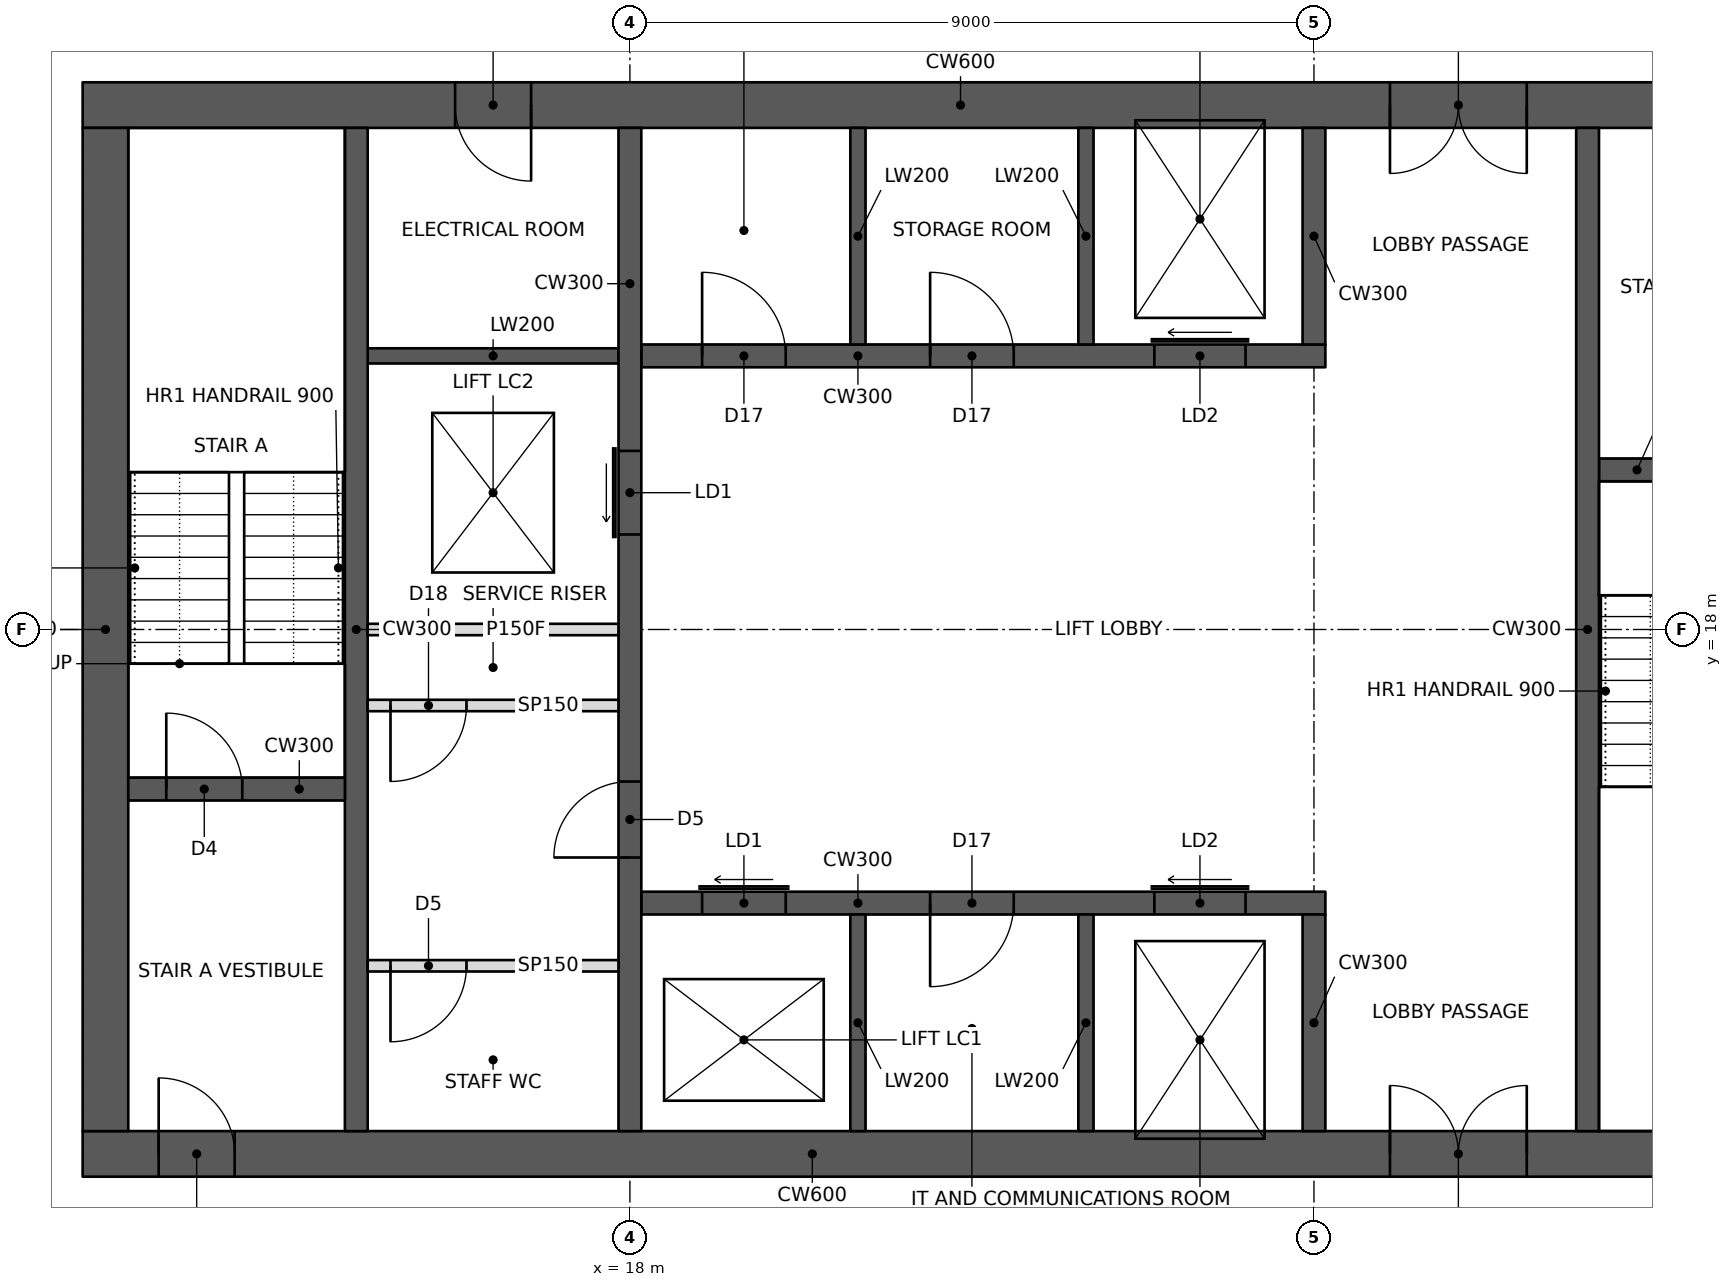
"""IFC4 building model, lengths in metres.
Left out: names, types, materials, properties, quantities, classifications, styles, units other than length and angle.
Written with IfcOpenShell. Run it as: python <this file> out.ifc"""

import sys

from ifc_helpers import new_model, si_unit, direction, frame, frame_2d, origin, place, context, subcontext, project, spatial, rectangle, extrude, element, fill, save


model = new_model("IFC4")
c1 = context("Model", 3, precision=1e-05, world=origin(), true_north=direction((0.0, 1.0)))
c2 = subcontext(c1, "Body", "Model", "MODEL_VIEW")
j1 = project(units=[si_unit("LENGTHUNIT", "METRE"), si_unit("PLANEANGLEUNIT", "RADIAN")], contexts=[c1])
p1 = place(None, origin())
s1 = spatial("IfcSite", under=j1, at=p1, CompositionType="ELEMENT")
p2 = place(p1, origin())
s2 = spatial("IfcBuilding", under=s1, at=p2, CompositionType="ELEMENT")
p3 = place(p2, frame((0.0, 0.0, 187.6)))
s3 = spatial("IfcBuildingStorey", under=s2, at=p3, CompositionType="ELEMENT", Elevation=187.6)
p4 = place(p3, frame((10.8, 11.1, 0.0), z_axis=(0.0, 0.0, 1.0), x_axis=(1.0, 0.0, 0.0)))
e1 = element("IfcWall", 1, at=p4, inside=s3, PredefinedType="SHEAR", context=c2, shape_type="SweptSolid", body=[
    extrude(rectangle(XDim=23.4, YDim=0.6, at=frame_2d((11.7, 0.0))), origin(), (0.0, 0.0, 1.0), 3.4),
])
p5 = place(p4, frame((1.0, 0.0, 0.0)))
e2 = element("IfcOpeningElement", 2, at=p5, cuts=e1, PredefinedType="OPENING", context=c2, shape_type="SweptSolid", body=[
    extrude(rectangle(XDim=1.0, YDim=2.1, at=frame_2d((0.5, 1.05))), frame((0.0, 0.31, 0.0), z_axis=(0.0, -1.0, 0.0), x_axis=(1.0, 0.0, 0.0)), (0.0, 0.0, 1.0), 0.62),
])
p6 = place(p4, frame((17.2, 0.0, 0.0)))
e3 = element("IfcOpeningElement", 3, at=p6, cuts=e1, PredefinedType="OPENING", context=c2, shape_type="SweptSolid", body=[
    extrude(rectangle(XDim=1.8, YDim=2.1, at=frame_2d((0.9, 1.05))), frame((0.0, 0.31, 0.0), z_axis=(0.0, -1.0, 0.0), x_axis=(1.0, 0.0, 0.0)), (0.0, 0.0, 1.0), 0.62),
])
p7 = place(p3, frame((10.8, 24.9, 0.0), z_axis=(0.0, 0.0, 1.0), x_axis=(1.0, 0.0, 0.0)))
e4 = element("IfcWall", 4, at=p7, inside=s3, PredefinedType="SHEAR", context=c2, shape_type="SweptSolid", body=[
    extrude(rectangle(XDim=23.4, YDim=0.6, at=frame_2d((11.7, 0.0))), origin(), (0.0, 0.0, 1.0), 3.4),
])
p8 = place(p7, frame((17.2, 0.0, 0.0)))
e5 = element("IfcOpeningElement", 5, at=p8, cuts=e4, PredefinedType="OPENING", context=c2, shape_type="SweptSolid", body=[
    extrude(rectangle(XDim=1.8, YDim=2.1, at=frame_2d((0.9, 1.05))), frame((0.0, 0.31, 0.0), z_axis=(0.0, -1.0, 0.0), x_axis=(1.0, 0.0, 0.0)), (0.0, 0.0, 1.0), 0.62),
])
p9 = place(p7, frame((21.1, 0.0, 0.0)))
e6 = element("IfcOpeningElement", 6, at=p9, cuts=e4, PredefinedType="OPENING", context=c2, shape_type="SweptSolid", body=[
    extrude(rectangle(XDim=1.0, YDim=2.1, at=frame_2d((0.5, 1.05))), frame((0.0, 0.31, 0.0), z_axis=(0.0, -1.0, 0.0), x_axis=(1.0, 0.0, 0.0)), (0.0, 0.0, 1.0), 0.62),
])
p10 = place(p7, frame((4.9, 0.0, 0.0)))
e7 = element("IfcOpeningElement", 7, at=p10, cuts=e4, PredefinedType="OPENING", context=c2, shape_type="SweptSolid", body=[
    extrude(rectangle(XDim=1.0, YDim=2.1, at=frame_2d((0.5, 1.05))), frame((0.0, 0.31, 0.0), z_axis=(0.0, -1.0, 0.0), x_axis=(1.0, 0.0, 0.0)), (0.0, 0.0, 1.0), 0.62),
])
p11 = place(p3, frame((11.1, 11.4, 0.0), z_axis=(0.0, 0.0, 1.0), x_axis=(0.0, 1.0, 0.0)))
e8 = element("IfcWall", 8, at=p11, inside=s3, PredefinedType="SHEAR", context=c2, shape_type="SweptSolid", body=[
    extrude(rectangle(XDim=13.2, YDim=0.6, at=frame_2d((6.6, 0.0))), origin(), (0.0, 0.0, 1.0), 3.4),
])
p12 = place(p3, frame((14.4, 11.4, 0.0), z_axis=(0.0, 0.0, 1.0), x_axis=(0.0, 1.0, 0.0)))
e9 = element("IfcWall", 9, at=p12, inside=s3, PredefinedType="SHEAR", context=c2, shape_type="SweptSolid", body=[
    extrude(rectangle(XDim=13.2, YDim=0.3, at=frame_2d((6.6, 0.0))), origin(), (0.0, 0.0, 1.0), 3.4),
])
p13 = place(p3, frame((11.4, 15.9, 0.0), z_axis=(0.0, 0.0, 1.0), x_axis=(1.0, 0.0, 0.0)))
e10 = element("IfcWall", 10, at=p13, inside=s3, PredefinedType="SHEAR", context=c2, shape_type="SweptSolid", body=[
    extrude(rectangle(XDim=2.85, YDim=0.3, at=frame_2d((1.425, 0.0))), origin(), (0.0, 0.0, 1.0), 3.4),
])
p14 = place(p13, frame((0.5, 0.0, 0.0)))
e11 = element("IfcOpeningElement", 11, at=p14, cuts=e10, PredefinedType="OPENING", context=c2, shape_type="SweptSolid", body=[
    extrude(rectangle(XDim=1.0, YDim=2.1, at=frame_2d((0.5, 1.05))), frame((0.0, 0.16, 0.0), z_axis=(0.0, -1.0, 0.0), x_axis=(1.0, 0.0, 0.0)), (0.0, 0.0, 1.0), 0.32),
])
p15 = place(p3, frame((18.0, 11.4, 0.0), z_axis=(0.0, 0.0, 1.0), x_axis=(0.0, 1.0, 0.0)))
e12 = element("IfcWall", 12, at=p15, inside=s3, PredefinedType="SHEAR", context=c2, shape_type="SweptSolid", body=[
    extrude(rectangle(XDim=13.2, YDim=0.3, at=frame_2d((6.6, 0.0))), origin(), (0.0, 0.0, 1.0), 3.4),
])
p16 = place(p15, frame((3.6, 0.0, 0.0)))
e13 = element("IfcOpeningElement", 13, at=p16, cuts=e12, PredefinedType="OPENING", context=c2, shape_type="SweptSolid", body=[
    extrude(rectangle(XDim=1.0, YDim=2.1, at=frame_2d((0.5, 1.05))), frame((0.0, 0.16, 0.0), z_axis=(0.0, -1.0, 0.0), x_axis=(1.0, 0.0, 0.0)), (0.0, 0.0, 1.0), 0.32),
])
p17 = place(p15, frame((7.85, 0.0, 0.0)))
e14 = element("IfcOpeningElement", 14, at=p17, cuts=e12, PredefinedType="OPENING", context=c2, shape_type="SweptSolid", body=[
    extrude(rectangle(XDim=1.1, YDim=2.1, at=frame_2d((0.55, 1.05))), frame((0.0, 0.16, 0.0), z_axis=(0.0, -1.0, 0.0), x_axis=(1.0, 0.0, 0.0)), (0.0, 0.0, 1.0), 0.32),
])
p18 = place(p3, frame((14.55, 18.0, 0.0), z_axis=(0.0, 0.0, 1.0), x_axis=(1.0, 0.0, 0.0)))
e15 = element("IfcWall", 15, at=p18, inside=s3, PredefinedType="PARTITIONING", context=c2, shape_type="SweptSolid", body=[
    extrude(rectangle(XDim=3.3, YDim=0.15, at=frame_2d((1.65, 0.0))), origin(), (0.0, 0.0, 1.0), 3.2),
])
p19 = place(p3, frame((18.15, 14.4, 0.0), z_axis=(0.0, 0.0, 1.0), x_axis=(1.0, 0.0, 0.0)))
e16 = element("IfcWall", 16, at=p19, inside=s3, PredefinedType="SHEAR", context=c2, shape_type="SweptSolid", body=[
    extrude(rectangle(XDim=9.0, YDim=0.3, at=frame_2d((4.5, 0.0))), origin(), (0.0, 0.0, 1.0), 3.4),
])
p20 = place(p19, frame((0.8, 0.0, 0.0)))
e17 = element("IfcOpeningElement", 17, at=p20, cuts=e16, PredefinedType="OPENING", context=c2, shape_type="SweptSolid", body=[
    extrude(rectangle(XDim=1.1, YDim=2.1, at=frame_2d((0.55, 1.05))), frame((0.0, 0.16, 0.0), z_axis=(0.0, -1.0, 0.0), x_axis=(1.0, 0.0, 0.0)), (0.0, 0.0, 1.0), 0.32),
])
p21 = place(p19, frame((6.75, 0.0, 0.0)))
e18 = element("IfcOpeningElement", 18, at=p21, cuts=e16, PredefinedType="OPENING", context=c2, shape_type="SweptSolid", body=[
    extrude(rectangle(XDim=1.2, YDim=2.1, at=frame_2d((0.6, 1.05))), frame((0.0, 0.16, 0.0), z_axis=(0.0, -1.0, 0.0), x_axis=(1.0, 0.0, 0.0)), (0.0, 0.0, 1.0), 0.32),
])
p22 = place(p19, frame((3.8, 0.0, 0.0)))
e19 = element("IfcOpeningElement", 19, at=p22, cuts=e16, PredefinedType="OPENING", context=c2, shape_type="SweptSolid", body=[
    extrude(rectangle(XDim=1.1, YDim=2.1, at=frame_2d((0.55, 1.05))), frame((0.0, 0.16, 0.0), z_axis=(0.0, -1.0, 0.0), x_axis=(1.0, 0.0, 0.0)), (0.0, 0.0, 1.0), 0.32),
])
p23 = place(p3, frame((27.0, 11.4, 0.0), z_axis=(0.0, 0.0, 1.0), x_axis=(0.0, 1.0, 0.0)))
e20 = element("IfcWall", 20, at=p23, inside=s3, PredefinedType="SHEAR", context=c2, shape_type="SweptSolid", body=[
    extrude(rectangle(XDim=2.85, YDim=0.3, at=frame_2d((1.425, 0.0))), origin(), (0.0, 0.0, 1.0), 3.4),
])
for number, where, z_axis, x_axis in (
    (21, (21.0, 11.4, 0.0), (0.0, 0.0, 1.0), (0.0, 1.0, 0.0)),
    (22, (24.0, 11.4, 0.0), (0.0, 0.0, 1.0), (0.0, 1.0, 0.0)),
):
    element("IfcWall", number, at=place(p3, frame(where, z_axis=z_axis, x_axis=x_axis)), inside=s3, PredefinedType="SHEAR", context=c2, shape_type="SweptSolid", body=[
        extrude(rectangle(XDim=2.85, YDim=0.2, at=frame_2d((1.425, 0.0))), origin(), (0.0, 0.0, 1.0), 3.4),
    ])
p24 = place(p3, frame((18.15, 21.6, 0.0), z_axis=(0.0, 0.0, 1.0), x_axis=(1.0, 0.0, 0.0)))
e23 = element("IfcWall", 23, at=p24, inside=s3, PredefinedType="SHEAR", context=c2, shape_type="SweptSolid", body=[
    extrude(rectangle(XDim=9.0, YDim=0.3, at=frame_2d((4.5, 0.0))), origin(), (0.0, 0.0, 1.0), 3.4),
])
p25 = place(p24, frame((6.75, 0.0, 0.0)))
e24 = element("IfcOpeningElement", 24, at=p25, cuts=e23, PredefinedType="OPENING", context=c2, shape_type="SweptSolid", body=[
    extrude(rectangle(XDim=1.2, YDim=2.1, at=frame_2d((0.6, 1.05))), frame((0.0, 0.16, 0.0), z_axis=(0.0, -1.0, 0.0), x_axis=(1.0, 0.0, 0.0)), (0.0, 0.0, 1.0), 0.32),
])
p26 = place(p24, frame((0.8, 0.0, 0.0)))
e25 = element("IfcOpeningElement", 25, at=p26, cuts=e23, PredefinedType="OPENING", context=c2, shape_type="SweptSolid", body=[
    extrude(rectangle(XDim=1.1, YDim=2.1, at=frame_2d((0.55, 1.05))), frame((0.0, 0.16, 0.0), z_axis=(0.0, -1.0, 0.0), x_axis=(1.0, 0.0, 0.0)), (0.0, 0.0, 1.0), 0.32),
])
p27 = place(p24, frame((3.8, 0.0, 0.0)))
e26 = element("IfcOpeningElement", 26, at=p27, cuts=e23, PredefinedType="OPENING", context=c2, shape_type="SweptSolid", body=[
    extrude(rectangle(XDim=1.1, YDim=2.1, at=frame_2d((0.55, 1.05))), frame((0.0, 0.16, 0.0), z_axis=(0.0, -1.0, 0.0), x_axis=(1.0, 0.0, 0.0)), (0.0, 0.0, 1.0), 0.32),
])
p28 = place(p3, frame((27.0, 21.75, 0.0), z_axis=(0.0, 0.0, 1.0), x_axis=(0.0, 1.0, 0.0)))
e27 = element("IfcWall", 27, at=p28, inside=s3, PredefinedType="SHEAR", context=c2, shape_type="SweptSolid", body=[
    extrude(rectangle(XDim=2.85, YDim=0.3, at=frame_2d((1.425, 0.0))), origin(), (0.0, 0.0, 1.0), 3.4),
])
for number, where, z_axis, x_axis in (
    (28, (21.0, 21.75, 0.0), (0.0, 0.0, 1.0), (0.0, 1.0, 0.0)),
    (29, (24.0, 21.75, 0.0), (0.0, 0.0, 1.0), (0.0, 1.0, 0.0)),
):
    element("IfcWall", number, at=place(p3, frame(where, z_axis=z_axis, x_axis=x_axis)), inside=s3, PredefinedType="SHEAR", context=c2, shape_type="SweptSolid", body=[
        extrude(rectangle(XDim=2.85, YDim=0.2, at=frame_2d((1.425, 0.0))), origin(), (0.0, 0.0, 1.0), 3.4),
    ])
p29 = place(p3, frame((30.6, 11.4, 0.0), z_axis=(0.0, 0.0, 1.0), x_axis=(0.0, 1.0, 0.0)))
e30 = element("IfcWall", 30, at=p29, inside=s3, PredefinedType="SHEAR", context=c2, shape_type="SweptSolid", body=[
    extrude(rectangle(XDim=13.2, YDim=0.3, at=frame_2d((6.6, 0.0))), origin(), (0.0, 0.0, 1.0), 3.4),
])
p30 = place(p3, frame((30.75, 20.1, 0.0), z_axis=(0.0, 0.0, 1.0), x_axis=(1.0, 0.0, 0.0)))
e31 = element("IfcWall", 31, at=p30, inside=s3, PredefinedType="SHEAR", context=c2, shape_type="SweptSolid", body=[
    extrude(rectangle(XDim=2.85, YDim=0.3, at=frame_2d((1.425, 0.0))), origin(), (0.0, 0.0, 1.0), 3.4),
])
p31 = place(p30, frame((1.15, 0.0, 0.0)))
e32 = element("IfcOpeningElement", 32, at=p31, cuts=e31, PredefinedType="OPENING", context=c2, shape_type="SweptSolid", body=[
    extrude(rectangle(XDim=1.0, YDim=2.1, at=frame_2d((0.5, 1.05))), frame((0.0, 0.16, 0.0), z_axis=(0.0, -1.0, 0.0), x_axis=(1.0, 0.0, 0.0)), (0.0, 0.0, 1.0), 0.32),
])
p32 = place(p3, frame((14.55, 21.6, 0.0), z_axis=(0.0, 0.0, 1.0), x_axis=(1.0, 0.0, 0.0)))
e33 = element("IfcWall", 33, at=p32, inside=s3, PredefinedType="SHEAR", context=c2, shape_type="SweptSolid", body=[
    extrude(rectangle(XDim=3.3, YDim=0.2, at=frame_2d((1.65, 0.0))), origin(), (0.0, 0.0, 1.0), 3.4),
])
p33 = place(p3, frame((14.55, 17.0, 0.0), z_axis=(0.0, 0.0, 1.0), x_axis=(1.0, 0.0, 0.0)))
e34 = element("IfcWall", 34, at=p33, inside=s3, PredefinedType="PARTITIONING", context=c2, shape_type="SweptSolid", body=[
    extrude(rectangle(XDim=3.3, YDim=0.15, at=frame_2d((1.65, 0.0))), origin(), (0.0, 0.0, 1.0), 3.2),
])
p34 = place(p33, frame((0.3, 0.0, 0.0)))
e35 = element("IfcOpeningElement", 35, at=p34, cuts=e34, PredefinedType="OPENING", context=c2, shape_type="SweptSolid", body=[
    extrude(rectangle(XDim=1.0, YDim=2.1, at=frame_2d((0.5, 1.05))), frame((0.0, 0.085, 0.0), z_axis=(0.0, -1.0, 0.0), x_axis=(1.0, 0.0, 0.0)), (0.0, 0.0, 1.0), 0.17),
])
p35 = place(p3, frame((14.55, 13.575, 0.0), z_axis=(0.0, 0.0, 1.0), x_axis=(1.0, 0.0, 0.0)))
e36 = element("IfcWall", 36, at=p35, inside=s3, PredefinedType="PARTITIONING", context=c2, shape_type="SweptSolid", body=[
    extrude(rectangle(XDim=3.3, YDim=0.15, at=frame_2d((1.65, 0.0))), origin(), (0.0, 0.0, 1.0), 3.2),
])
p36 = place(p35, frame((0.3, 0.0, 0.0)))
e37 = element("IfcOpeningElement", 37, at=p36, cuts=e36, PredefinedType="OPENING", context=c2, shape_type="SweptSolid", body=[
    extrude(rectangle(XDim=1.0, YDim=2.1, at=frame_2d((0.5, 1.05))), frame((0.0, 0.085, 0.0), z_axis=(0.0, -1.0, 0.0), x_axis=(1.0, 0.0, 0.0)), (0.0, 0.0, 1.0), 0.17),
])
p37 = place(p34, frame((1.0, 0.0, 0.0), z_axis=(0.0, 0.0, 1.0), x_axis=(-1.0, 0.0, 0.0)))
e38 = element("IfcDoor", 38, at=p37, inside=s3, OperationType="SINGLE_SWING_RIGHT", PredefinedType="DOOR", context=c2, shape_type="SweptSolid", body=[
    extrude(rectangle(XDim=1.0, YDim=2.1, at=frame_2d((0.5, 1.05))), frame((0.0, 0.025, 0.0), z_axis=(0.0, -1.0, 0.0), x_axis=(1.0, 0.0, 0.0)), (0.0, 0.0, 1.0), 0.05),
])
fill(e35, e38)
p38 = place(p36, frame((1.0, 0.0, 0.0), z_axis=(0.0, 0.0, 1.0), x_axis=(-1.0, 0.0, 0.0)))
e39 = element("IfcDoor", 39, at=p38, inside=s3, OperationType="SINGLE_SWING_RIGHT", PredefinedType="DOOR", context=c2, shape_type="SweptSolid", body=[
    extrude(rectangle(XDim=1.0, YDim=2.1, at=frame_2d((0.5, 1.05))), frame((0.0, 0.025, 0.0), z_axis=(0.0, -1.0, 0.0), x_axis=(1.0, 0.0, 0.0)), (0.0, 0.0, 1.0), 0.05),
])
fill(e37, e39)
p39 = place(p5, origin())
e40 = element("IfcDoor", 40, at=p39, inside=s3, OperationType="SINGLE_SWING_LEFT", PredefinedType="DOOR", context=c2, shape_type="SweptSolid", body=[
    extrude(rectangle(XDim=1.0, YDim=2.1, at=frame_2d((0.5, 1.05))), frame((0.0, 0.025, 0.0), z_axis=(0.0, -1.0, 0.0), x_axis=(1.0, 0.0, 0.0)), (0.0, 0.0, 1.0), 0.05),
])
fill(e2, e40)
p40 = place(p14, origin())
e41 = element("IfcDoor", 41, at=p40, inside=s3, OperationType="SINGLE_SWING_LEFT", PredefinedType="DOOR", context=c2, shape_type="SweptSolid", body=[
    extrude(rectangle(XDim=1.0, YDim=2.1, at=frame_2d((0.5, 1.05))), frame((0.0, 0.025, 0.0), z_axis=(0.0, -1.0, 0.0), x_axis=(1.0, 0.0, 0.0)), (0.0, 0.0, 1.0), 0.05),
])
fill(e11, e41)
p41 = place(p6, origin())
e42 = element("IfcDoor", 42, at=p41, inside=s3, OperationType="DOUBLE_DOOR_SINGLE_SWING", PredefinedType="DOOR", context=c2, shape_type="SweptSolid", body=[
    extrude(rectangle(XDim=1.8, YDim=2.1, at=frame_2d((0.9, 1.05))), frame((0.0, 0.025, 0.0), z_axis=(0.0, -1.0, 0.0), x_axis=(1.0, 0.0, 0.0)), (0.0, 0.0, 1.0), 0.05),
])
fill(e3, e42)
p42 = place(p8, frame((1.8, 0.0, 0.0), z_axis=(0.0, 0.0, 1.0), x_axis=(-1.0, 0.0, 0.0)))
e43 = element("IfcDoor", 43, at=p42, inside=s3, OperationType="DOUBLE_DOOR_SINGLE_SWING", PredefinedType="DOOR", context=c2, shape_type="SweptSolid", body=[
    extrude(rectangle(XDim=1.8, YDim=2.1, at=frame_2d((0.9, 1.05))), frame((0.0, 0.025, 0.0), z_axis=(0.0, -1.0, 0.0), x_axis=(1.0, 0.0, 0.0)), (0.0, 0.0, 1.0), 0.05),
])
fill(e5, e43)
p43 = place(p16, origin())
e44 = element("IfcDoor", 44, at=p43, inside=s3, OperationType="SINGLE_SWING_LEFT", PredefinedType="DOOR", context=c2, shape_type="SweptSolid", body=[
    extrude(rectangle(XDim=1.0, YDim=2.1, at=frame_2d((0.5, 1.05))), frame((0.0, 0.025, 0.0), z_axis=(0.0, -1.0, 0.0), x_axis=(1.0, 0.0, 0.0)), (0.0, 0.0, 1.0), 0.05),
])
fill(e13, e44)
p44 = place(p10, frame((1.0, 0.0, 0.0), z_axis=(0.0, 0.0, 1.0), x_axis=(-1.0, 0.0, 0.0)))
e45 = element("IfcDoor", 45, at=p44, inside=s3, OperationType="SINGLE_SWING_LEFT", PredefinedType="DOOR", context=c2, shape_type="SweptSolid", body=[
    extrude(rectangle(XDim=1.0, YDim=2.1, at=frame_2d((0.5, 1.05))), frame((0.0, 0.025, 0.0), z_axis=(0.0, -1.0, 0.0), x_axis=(1.0, 0.0, 0.0)), (0.0, 0.0, 1.0), 0.05),
])
fill(e7, e45)
p45 = place(p20, origin())
e46 = element("IfcDoor", 46, at=p45, inside=s3, OperationType="SLIDING_TO_LEFT", PredefinedType="DOOR", context=c2, shape_type="SweptSolid", body=[
    extrude(rectangle(XDim=1.1, YDim=2.1, at=frame_2d((0.55, 1.05))), frame((0.0, 0.025, 0.0), z_axis=(0.0, -1.0, 0.0), x_axis=(1.0, 0.0, 0.0)), (0.0, 0.0, 1.0), 0.05),
])
fill(e17, e46)
p46 = place(p17, origin())
e47 = element("IfcDoor", 47, at=p46, inside=s3, OperationType="SLIDING_TO_LEFT", PredefinedType="DOOR", context=c2, shape_type="SweptSolid", body=[
    extrude(rectangle(XDim=1.1, YDim=2.1, at=frame_2d((0.55, 1.05))), frame((0.0, 0.025, 0.0), z_axis=(0.0, -1.0, 0.0), x_axis=(1.0, 0.0, 0.0)), (0.0, 0.0, 1.0), 0.05),
])
fill(e14, e47)
p47 = place(p21, origin())
e48 = element("IfcDoor", 48, at=p47, inside=s3, OperationType="SLIDING_TO_LEFT", PredefinedType="DOOR", context=c2, shape_type="SweptSolid", body=[
    extrude(rectangle(XDim=1.2, YDim=2.1, at=frame_2d((0.6, 1.05))), frame((0.0, 0.025, 0.0), z_axis=(0.0, -1.0, 0.0), x_axis=(1.0, 0.0, 0.0)), (0.0, 0.0, 1.0), 0.05),
])
fill(e18, e48)
p48 = place(p25, origin())
e49 = element("IfcDoor", 49, at=p48, inside=s3, OperationType="SLIDING_TO_LEFT", PredefinedType="DOOR", context=c2, shape_type="SweptSolid", body=[
    extrude(rectangle(XDim=1.2, YDim=2.1, at=frame_2d((0.6, 1.05))), frame((0.0, 0.025, 0.0), z_axis=(0.0, -1.0, 0.0), x_axis=(1.0, 0.0, 0.0)), (0.0, 0.0, 1.0), 0.05),
])
fill(e24, e49)
p49 = place(p26, origin())
e50 = element("IfcDoor", 50, at=p49, inside=s3, OperationType="SINGLE_SWING_LEFT", PredefinedType="DOOR", context=c2, shape_type="SweptSolid", body=[
    extrude(rectangle(XDim=1.1, YDim=2.1, at=frame_2d((0.55, 1.05))), frame((0.0, 0.025, 0.0), z_axis=(0.0, -1.0, 0.0), x_axis=(1.0, 0.0, 0.0)), (0.0, 0.0, 1.0), 0.05),
])
fill(e25, e50)
p50 = place(p27, origin())
e51 = element("IfcDoor", 51, at=p50, inside=s3, OperationType="SINGLE_SWING_LEFT", PredefinedType="DOOR", context=c2, shape_type="SweptSolid", body=[
    extrude(rectangle(XDim=1.1, YDim=2.1, at=frame_2d((0.55, 1.05))), frame((0.0, 0.025, 0.0), z_axis=(0.0, -1.0, 0.0), x_axis=(1.0, 0.0, 0.0)), (0.0, 0.0, 1.0), 0.05),
])
fill(e26, e51)
p51 = place(p22, frame((1.1, 0.0, 0.0), z_axis=(0.0, 0.0, 1.0), x_axis=(-1.0, 0.0, 0.0)))
e52 = element("IfcDoor", 52, at=p51, inside=s3, OperationType="SINGLE_SWING_RIGHT", PredefinedType="DOOR", context=c2, shape_type="SweptSolid", body=[
    extrude(rectangle(XDim=1.1, YDim=2.1, at=frame_2d((0.55, 1.05))), frame((0.0, 0.025, 0.0), z_axis=(0.0, -1.0, 0.0), x_axis=(1.0, 0.0, 0.0)), (0.0, 0.0, 1.0), 0.05),
])
fill(e19, e52)
save(model, sys.argv[1])
